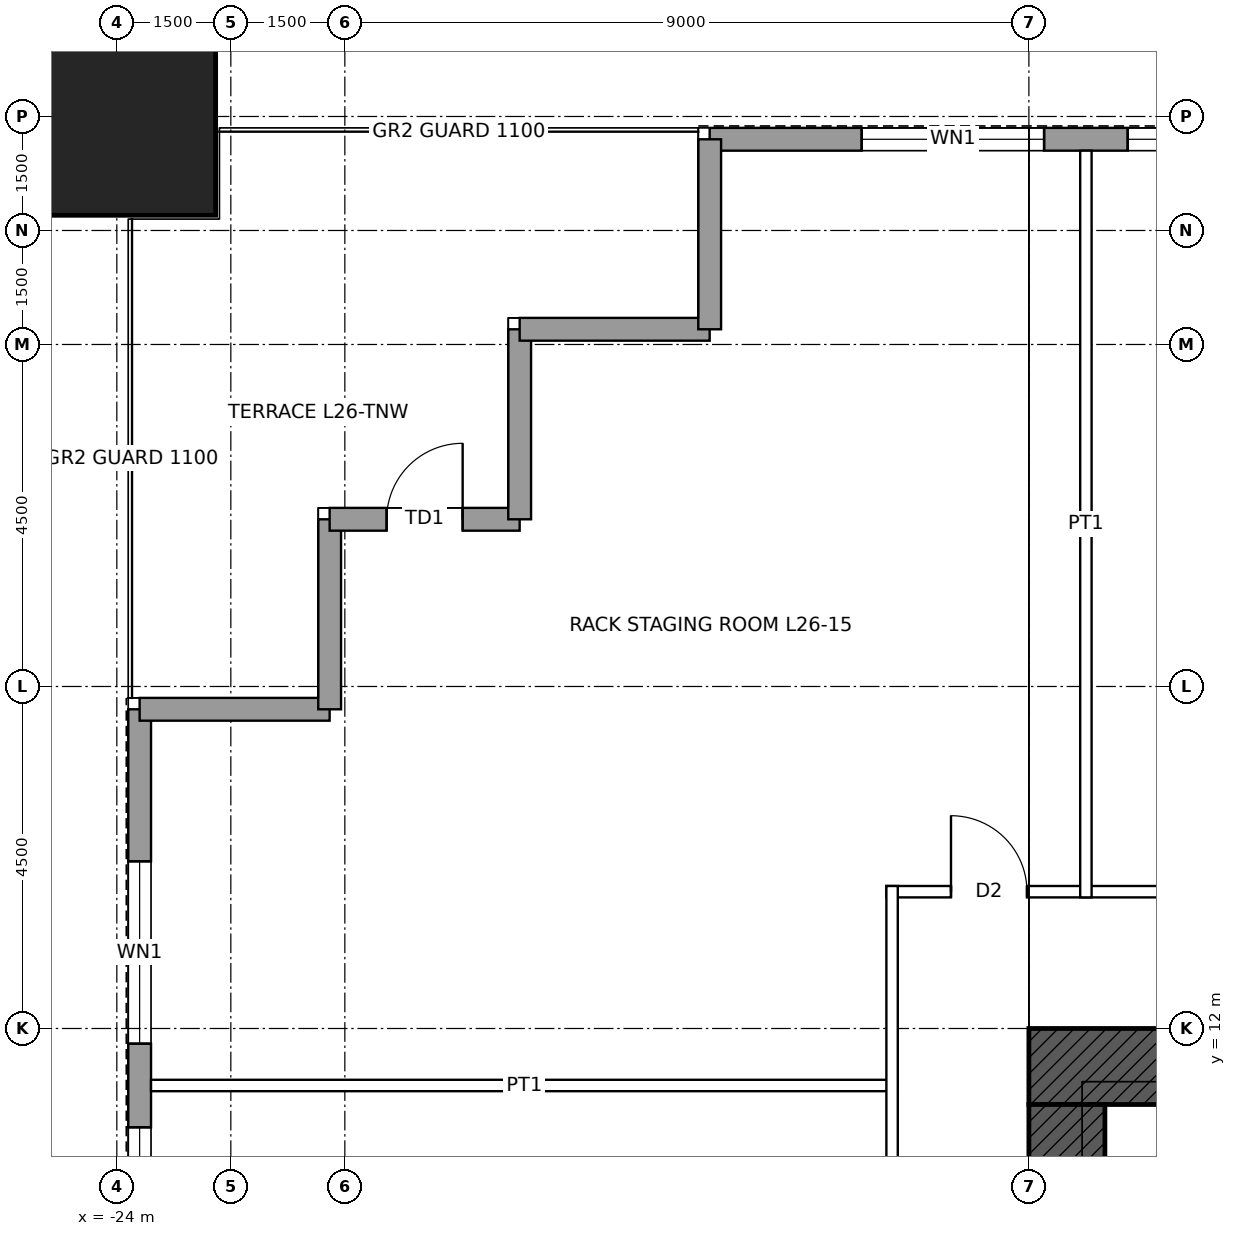
"""IFC4 building model, lengths in metres.
Left out: names, types, materials, properties, quantities, classifications, styles, units other than length and angle.
Written with IfcOpenShell. Run it as: python <this file> out.ifc"""

import sys

from ifc_helpers import new_model, si_unit, direction, frame, frame_2d, origin, origin_2d, place, context, subcontext, project, spatial, rectangle, hollow_rectangle, extrude, element, fill, save


model = new_model("IFC4")
c1 = context("Model", 3, precision=1e-05, world=origin(), true_north=direction((0.0, 1.0)))
c2 = subcontext(c1, "Body", "Model", "MODEL_VIEW")
j1 = project(units=[si_unit("LENGTHUNIT", "METRE"), si_unit("PLANEANGLEUNIT", "RADIAN")], contexts=[c1])
p1 = place(None, origin())
s1 = spatial("IfcSite", under=j1, at=p1, CompositionType="ELEMENT")
p2 = place(p1, origin())
s2 = spatial("IfcBuilding", under=s1, at=p2, CompositionType="ELEMENT")
p3 = place(p2, frame((0.0, 0.0, 131.4)))
s3 = spatial("IfcBuildingStorey", under=s2, at=p3, CompositionType="ELEMENT", Elevation=131.4)
p4 = place(p3, frame((-24.0, 24.0, 0.0), z_axis=(0.0, 0.0, 1.0), x_axis=(1.0, 0.0, 0.0)))
e1 = element("IfcColumn", 1, at=p4, inside=s3, PredefinedType="COLUMN", context=c2, shape_type="SweptSolid", body=[
    extrude(hollow_rectangle(XDim=2.6, YDim=2.6, WallThickness=0.13, at=origin_2d()), origin(), (0.0, 0.0, 1.0), 4.5),
])
p5 = place(p3, frame((-12.0, 11.5, 0.0), z_axis=(0.0, 0.0, 1.0), x_axis=(1.0, 0.0, 0.0)))
e2 = element("IfcWall", 2, at=p5, inside=s3, PredefinedType="SHEAR", context=c2, shape_type="SweptSolid", body=[
    extrude(rectangle(XDim=24.0, YDim=1.0, at=frame_2d((12.0, 0.0))), origin(), (0.0, 0.0, 1.0), 4.5),
])
p6 = place(p5, frame((6.25, 0.0, 0.0)))
e3 = element("IfcOpeningElement", 3, at=p6, cuts=e2, PredefinedType="OPENING", context=c2, shape_type="SweptSolid", body=[
    extrude(rectangle(XDim=1.0, YDim=2.4, at=frame_2d((0.5, 1.2))), frame((0.0, 0.51, 0.0), z_axis=(0.0, -1.0, 0.0), x_axis=(1.0, 0.0, 0.0)), (0.0, 0.0, 1.0), 1.02),
])
p7 = place(p5, frame((16.75, 0.0, 0.0)))
e4 = element("IfcOpeningElement", 4, at=p7, cuts=e2, PredefinedType="OPENING", context=c2, shape_type="SweptSolid", body=[
    extrude(rectangle(XDim=1.0, YDim=2.4, at=frame_2d((0.5, 1.2))), frame((0.0, 0.51, 0.0), z_axis=(0.0, -1.0, 0.0), x_axis=(1.0, 0.0, 0.0)), (0.0, 0.0, 1.0), 1.02),
])
p8 = place(p3, frame((-11.5, -11.0, 0.0), z_axis=(0.0, 0.0, 1.0), x_axis=(0.0, 1.0, 0.0)))
e5 = element("IfcWall", 5, at=p8, inside=s3, PredefinedType="SHEAR", context=c2, shape_type="SweptSolid", body=[
    extrude(rectangle(XDim=22.0, YDim=1.0, at=frame_2d((11.0, 0.0))), origin(), (0.0, 0.0, 1.0), 4.5),
])
p9 = place(p8, frame((10.5, 0.0, 0.0)))
e6 = element("IfcOpeningElement", 6, at=p9, cuts=e5, PredefinedType="OPENING", context=c2, shape_type="SweptSolid", body=[
    extrude(rectangle(XDim=1.0, YDim=2.4, at=frame_2d((0.5, 1.2))), frame((0.0, 0.51, 0.0), z_axis=(0.0, -1.0, 0.0), x_axis=(1.0, 0.0, 0.0)), (0.0, 0.0, 1.0), 1.02),
])
p10 = place(p3, frame((-16.2, 23.7, 0.0), z_axis=(0.0, 0.0, 1.0), x_axis=(1.0, 0.0, 0.0)))
e7 = element("IfcWall", 7, at=p10, inside=s3, PredefinedType="SOLIDWALL", context=c2, shape_type="SweptSolid", body=[
    extrude(rectangle(XDim=32.4, YDim=0.3, at=frame_2d((16.2, 0.0))), origin(), (0.0, 0.0, 1.0), 4.3),
])
p11 = place(p10, frame((2.0, 0.0, 1.0)))
e8 = element("IfcOpeningElement", 8, at=p11, cuts=e7, PredefinedType="OPENING", context=c2, shape_type="SweptSolid", body=[
    extrude(rectangle(XDim=2.4, YDim=1.2, at=frame_2d((1.2, 0.6))), frame((0.0, 0.16, 0.0), z_axis=(0.0, -1.0, 0.0), x_axis=(1.0, 0.0, 0.0)), (0.0, 0.0, 1.0), 0.32),
])
p12 = place(p10, frame((5.5, 0.0, 1.0)))
e9 = element("IfcOpeningElement", 9, at=p12, cuts=e7, PredefinedType="OPENING", context=c2, shape_type="SweptSolid", body=[
    extrude(rectangle(XDim=2.4, YDim=1.2, at=frame_2d((1.2, 0.6))), frame((0.0, 0.16, 0.0), z_axis=(0.0, -1.0, 0.0), x_axis=(1.0, 0.0, 0.0)), (0.0, 0.0, 1.0), 0.32),
])
p13 = place(p10, frame((9.5, 0.0, 1.0)))
e10 = element("IfcOpeningElement", 10, at=p13, cuts=e7, PredefinedType="OPENING", context=c2, shape_type="SweptSolid", body=[
    extrude(rectangle(XDim=2.4, YDim=1.2, at=frame_2d((1.2, 0.6))), frame((0.0, 0.16, 0.0), z_axis=(0.0, -1.0, 0.0), x_axis=(1.0, 0.0, 0.0)), (0.0, 0.0, 1.0), 0.32),
])
p14 = place(p10, frame((13.0, 0.0, 1.0)))
e11 = element("IfcOpeningElement", 11, at=p14, cuts=e7, PredefinedType="OPENING", context=c2, shape_type="SweptSolid", body=[
    extrude(rectangle(XDim=2.4, YDim=1.2, at=frame_2d((1.2, 0.6))), frame((0.0, 0.16, 0.0), z_axis=(0.0, -1.0, 0.0), x_axis=(1.0, 0.0, 0.0)), (0.0, 0.0, 1.0), 0.32),
])
p15 = place(p10, frame((17.0, 0.0, 1.0)))
e12 = element("IfcOpeningElement", 12, at=p15, cuts=e7, PredefinedType="OPENING", context=c2, shape_type="SweptSolid", body=[
    extrude(rectangle(XDim=2.4, YDim=1.2, at=frame_2d((1.2, 0.6))), frame((0.0, 0.16, 0.0), z_axis=(0.0, -1.0, 0.0), x_axis=(1.0, 0.0, 0.0)), (0.0, 0.0, 1.0), 0.32),
])
p16 = place(p10, frame((20.5, 0.0, 1.0)))
e13 = element("IfcOpeningElement", 13, at=p16, cuts=e7, PredefinedType="OPENING", context=c2, shape_type="SweptSolid", body=[
    extrude(rectangle(XDim=2.4, YDim=1.2, at=frame_2d((1.2, 0.6))), frame((0.0, 0.16, 0.0), z_axis=(0.0, -1.0, 0.0), x_axis=(1.0, 0.0, 0.0)), (0.0, 0.0, 1.0), 0.32),
])
p17 = place(p10, frame((24.5, 0.0, 1.0)))
e14 = element("IfcOpeningElement", 14, at=p17, cuts=e7, PredefinedType="OPENING", context=c2, shape_type="SweptSolid", body=[
    extrude(rectangle(XDim=2.4, YDim=1.2, at=frame_2d((1.2, 0.6))), frame((0.0, 0.16, 0.0), z_axis=(0.0, -1.0, 0.0), x_axis=(1.0, 0.0, 0.0)), (0.0, 0.0, 1.0), 0.32),
])
p18 = place(p10, frame((28.0, 0.0, 1.0)))
e15 = element("IfcOpeningElement", 15, at=p18, cuts=e7, PredefinedType="OPENING", context=c2, shape_type="SweptSolid", body=[
    extrude(rectangle(XDim=2.4, YDim=1.2, at=frame_2d((1.2, 0.6))), frame((0.0, 0.16, 0.0), z_axis=(0.0, -1.0, 0.0), x_axis=(1.0, 0.0, 0.0)), (0.0, 0.0, 1.0), 0.32),
])
p19 = place(p3, frame((-23.7, -16.2, 0.0), z_axis=(0.0, 0.0, 1.0), x_axis=(0.0, 1.0, 0.0)))
e16 = element("IfcWall", 16, at=p19, inside=s3, PredefinedType="SOLIDWALL", context=c2, shape_type="SweptSolid", body=[
    extrude(rectangle(XDim=32.4, YDim=0.3, at=frame_2d((16.2, 0.0))), origin(), (0.0, 0.0, 1.0), 4.3),
])
p20 = place(p19, frame((2.0, 0.0, 1.0)))
e17 = element("IfcOpeningElement", 17, at=p20, cuts=e16, PredefinedType="OPENING", context=c2, shape_type="SweptSolid", body=[
    extrude(rectangle(XDim=2.4, YDim=1.2, at=frame_2d((1.2, 0.6))), frame((0.0, 0.16, 0.0), z_axis=(0.0, -1.0, 0.0), x_axis=(1.0, 0.0, 0.0)), (0.0, 0.0, 1.0), 0.32),
])
p21 = place(p19, frame((5.5, 0.0, 1.0)))
e18 = element("IfcOpeningElement", 18, at=p21, cuts=e16, PredefinedType="OPENING", context=c2, shape_type="SweptSolid", body=[
    extrude(rectangle(XDim=2.4, YDim=1.2, at=frame_2d((1.2, 0.6))), frame((0.0, 0.16, 0.0), z_axis=(0.0, -1.0, 0.0), x_axis=(1.0, 0.0, 0.0)), (0.0, 0.0, 1.0), 0.32),
])
p22 = place(p19, frame((9.5, 0.0, 1.0)))
e19 = element("IfcOpeningElement", 19, at=p22, cuts=e16, PredefinedType="OPENING", context=c2, shape_type="SweptSolid", body=[
    extrude(rectangle(XDim=2.4, YDim=1.2, at=frame_2d((1.2, 0.6))), frame((0.0, 0.16, 0.0), z_axis=(0.0, -1.0, 0.0), x_axis=(1.0, 0.0, 0.0)), (0.0, 0.0, 1.0), 0.32),
])
p23 = place(p19, frame((13.0, 0.0, 1.0)))
e20 = element("IfcOpeningElement", 20, at=p23, cuts=e16, PredefinedType="OPENING", context=c2, shape_type="SweptSolid", body=[
    extrude(rectangle(XDim=2.4, YDim=1.2, at=frame_2d((1.2, 0.6))), frame((0.0, 0.16, 0.0), z_axis=(0.0, -1.0, 0.0), x_axis=(1.0, 0.0, 0.0)), (0.0, 0.0, 1.0), 0.32),
])
p24 = place(p19, frame((17.0, 0.0, 1.0)))
e21 = element("IfcOpeningElement", 21, at=p24, cuts=e16, PredefinedType="OPENING", context=c2, shape_type="SweptSolid", body=[
    extrude(rectangle(XDim=2.4, YDim=1.2, at=frame_2d((1.2, 0.6))), frame((0.0, 0.16, 0.0), z_axis=(0.0, -1.0, 0.0), x_axis=(1.0, 0.0, 0.0)), (0.0, 0.0, 1.0), 0.32),
])
p25 = place(p19, frame((20.5, 0.0, 1.0)))
e22 = element("IfcOpeningElement", 22, at=p25, cuts=e16, PredefinedType="OPENING", context=c2, shape_type="SweptSolid", body=[
    extrude(rectangle(XDim=2.4, YDim=1.2, at=frame_2d((1.2, 0.6))), frame((0.0, 0.16, 0.0), z_axis=(0.0, -1.0, 0.0), x_axis=(1.0, 0.0, 0.0)), (0.0, 0.0, 1.0), 0.32),
])
p26 = place(p19, frame((24.5, 0.0, 1.0)))
e23 = element("IfcOpeningElement", 23, at=p26, cuts=e16, PredefinedType="OPENING", context=c2, shape_type="SweptSolid", body=[
    extrude(rectangle(XDim=2.4, YDim=1.2, at=frame_2d((1.2, 0.6))), frame((0.0, 0.16, 0.0), z_axis=(0.0, -1.0, 0.0), x_axis=(1.0, 0.0, 0.0)), (0.0, 0.0, 1.0), 0.32),
])
p27 = place(p19, frame((28.0, 0.0, 1.0)))
e24 = element("IfcOpeningElement", 24, at=p27, cuts=e16, PredefinedType="OPENING", context=c2, shape_type="SweptSolid", body=[
    extrude(rectangle(XDim=2.4, YDim=1.2, at=frame_2d((1.2, 0.6))), frame((0.0, 0.16, 0.0), z_axis=(0.0, -1.0, 0.0), x_axis=(1.0, 0.0, 0.0)), (0.0, 0.0, 1.0), 0.32),
])
for number, where, z_axis, x_axis in (
    (25, (-23.7, 16.2, 0.0), (0.0, 0.0, 1.0), (1.0, 0.0, 0.0)),
    (26, (-21.2, 16.2, 0.0), (0.0, 0.0, 1.0), (0.0, 1.0, 0.0)),
):
    element("IfcWall", number, at=place(p3, frame(where, z_axis=z_axis, x_axis=x_axis)), inside=s3, PredefinedType="SOLIDWALL", context=c2, shape_type="SweptSolid", body=[
        extrude(rectangle(XDim=2.5, YDim=0.3, at=frame_2d((1.25, 0.0))), origin(), (0.0, 0.0, 1.0), 4.3),
    ])
p28 = place(p3, frame((-21.2, 18.7, 0.0), z_axis=(0.0, 0.0, 1.0), x_axis=(1.0, 0.0, 0.0)))
e27 = element("IfcWall", 27, at=p28, inside=s3, PredefinedType="SOLIDWALL", context=c2, shape_type="SweptSolid", body=[
    extrude(rectangle(XDim=2.5, YDim=0.3, at=frame_2d((1.25, 0.0))), origin(), (0.0, 0.0, 1.0), 4.3),
])
p29 = place(p28, frame((0.75, 0.0, 0.0)))
e28 = element("IfcOpeningElement", 28, at=p29, cuts=e27, PredefinedType="OPENING", context=c2, shape_type="SweptSolid", body=[
    extrude(rectangle(XDim=1.0, YDim=2.4, at=frame_2d((0.5, 1.2))), frame((0.0, 0.16, 0.0), z_axis=(0.0, -1.0, 0.0), x_axis=(1.0, 0.0, 0.0)), (0.0, 0.0, 1.0), 0.32),
])
for number, where, z_axis, x_axis in (
    (29, (-18.7, 18.7, 0.0), (0.0, 0.0, 1.0), (0.0, 1.0, 0.0)),
    (30, (-18.7, 21.2, 0.0), (0.0, 0.0, 1.0), (1.0, 0.0, 0.0)),
    (31, (-16.2, 21.2, 0.0), (0.0, 0.0, 1.0), (0.0, 1.0, 0.0)),
):
    element("IfcWall", number, at=place(p3, frame(where, z_axis=z_axis, x_axis=x_axis)), inside=s3, PredefinedType="SOLIDWALL", context=c2, shape_type="SweptSolid", body=[
        extrude(rectangle(XDim=2.5, YDim=0.3, at=frame_2d((1.25, 0.0))), origin(), (0.0, 0.0, 1.0), 4.3),
    ])
p30 = place(p3, frame((-23.55, 11.25, 0.0), z_axis=(0.0, 0.0, 1.0), x_axis=(1.0, 0.0, 0.0)))
e32 = element("IfcWall", 32, at=p30, inside=s3, PredefinedType="PARTITIONING", context=c2, shape_type="SweptSolid", body=[
    extrude(rectangle(XDim=9.825, YDim=0.15, at=frame_2d((4.913, 0.0))), origin(), (0.0, 0.0, 1.0), 3.431),
])
p31 = place(p3, frame((-13.875, 13.8, 0.0), z_axis=(0.0, 0.0, 1.0), x_axis=(1.0, 0.0, 0.0)))
e33 = element("IfcWall", 33, at=p31, inside=s3, PredefinedType="PARTITIONING", context=c2, shape_type="SweptSolid", body=[
    extrude(rectangle(XDim=27.75, YDim=0.15, at=frame_2d((13.875, 0.0))), origin(), (0.0, 0.0, 1.0), 4.3),
])
p32 = place(p31, frame((5.475, 0.0, 0.0)))
e34 = element("IfcOpeningElement", 34, at=p32, cuts=e33, PredefinedType="OPENING", context=c2, shape_type="SweptSolid", body=[
    extrude(rectangle(XDim=1.8, YDim=2.4, at=frame_2d((0.9, 1.2))), frame((0.0, 0.085, 0.0), z_axis=(0.0, -1.0, 0.0), x_axis=(1.0, 0.0, 0.0)), (0.0, 0.0, 1.0), 0.17),
])
p33 = place(p31, frame((13.375, 0.0, 0.0)))
e35 = element("IfcOpeningElement", 35, at=p33, cuts=e33, PredefinedType="OPENING", context=c2, shape_type="SweptSolid", body=[
    extrude(rectangle(XDim=1.0, YDim=2.1, at=frame_2d((0.5, 1.05))), frame((0.0, 0.085, 0.0), z_axis=(0.0, -1.0, 0.0), x_axis=(1.0, 0.0, 0.0)), (0.0, 0.0, 1.0), 0.17),
])
p34 = place(p31, frame((20.475, 0.0, 0.0)))
e36 = element("IfcOpeningElement", 36, at=p34, cuts=e33, PredefinedType="OPENING", context=c2, shape_type="SweptSolid", body=[
    extrude(rectangle(XDim=1.8, YDim=2.4, at=frame_2d((0.9, 1.2))), frame((0.0, 0.085, 0.0), z_axis=(0.0, -1.0, 0.0), x_axis=(1.0, 0.0, 0.0)), (0.0, 0.0, 1.0), 0.17),
])
p35 = place(p31, frame((25.9, 0.0, 0.0)))
e37 = element("IfcOpeningElement", 37, at=p35, cuts=e33, PredefinedType="OPENING", context=c2, shape_type="SweptSolid", body=[
    extrude(rectangle(XDim=1.0, YDim=2.1, at=frame_2d((0.5, 1.05))), frame((0.0, 0.085, 0.0), z_axis=(0.0, -1.0, 0.0), x_axis=(1.0, 0.0, 0.0)), (0.0, 0.0, 1.0), 0.17),
])
p36 = place(p31, frame((0.85, 0.0, 0.0)))
e38 = element("IfcOpeningElement", 38, at=p36, cuts=e33, PredefinedType="OPENING", context=c2, shape_type="SweptSolid", body=[
    extrude(rectangle(XDim=1.0, YDim=2.1, at=frame_2d((0.5, 1.05))), frame((0.0, 0.085, 0.0), z_axis=(0.0, -1.0, 0.0), x_axis=(1.0, 0.0, 0.0)), (0.0, 0.0, 1.0), 0.17),
])
p37 = place(p3, frame((-13.8, -13.875, 0.0), z_axis=(0.0, 0.0, 1.0), x_axis=(0.0, 1.0, 0.0)))
e39 = element("IfcWall", 39, at=p37, inside=s3, PredefinedType="PARTITIONING", context=c2, shape_type="SweptSolid", body=[
    extrude(rectangle(XDim=27.75, YDim=0.15, at=frame_2d((13.875, 0.0))), origin(), (0.0, 0.0, 1.0), 4.3),
])
p38 = place(p37, frame((7.75, 0.0, 0.0)))
e40 = element("IfcOpeningElement", 40, at=p38, cuts=e39, PredefinedType="OPENING", context=c2, shape_type="SweptSolid", body=[
    extrude(rectangle(XDim=1.0, YDim=2.1, at=frame_2d((0.5, 1.05))), frame((0.0, 0.085, 0.0), z_axis=(0.0, -1.0, 0.0), x_axis=(1.0, 0.0, 0.0)), (0.0, 0.0, 1.0), 0.17),
])
p39 = place(p37, frame((18.6, 0.0, 0.0)))
e41 = element("IfcOpeningElement", 41, at=p39, cuts=e39, PredefinedType="OPENING", context=c2, shape_type="SweptSolid", body=[
    extrude(rectangle(XDim=1.8, YDim=2.4, at=frame_2d((0.9, 1.2))), frame((0.0, 0.085, 0.0), z_axis=(0.0, -1.0, 0.0), x_axis=(1.0, 0.0, 0.0)), (0.0, 0.0, 1.0), 0.17),
])
p40 = place(p3, frame((-11.25, 13.725, 0.0), z_axis=(0.0, 0.0, 1.0), x_axis=(0.0, 1.0, 0.0)))
e42 = element("IfcWall", 42, at=p40, inside=s3, PredefinedType="PARTITIONING", context=c2, shape_type="SweptSolid", body=[
    extrude(rectangle(XDim=9.825, YDim=0.15, at=frame_2d((4.913, 0.0))), origin(), (0.0, 0.0, 1.0), 3.431),
])
p41 = place(p11, origin())
e43 = element("IfcWindow", 43, at=p41, inside=s3, PartitioningType="SINGLE_PANEL", PredefinedType="WINDOW", context=c2, shape_type="SweptSolid", body=[
    extrude(rectangle(XDim=2.4, YDim=1.2, at=frame_2d((1.2, 0.6))), frame((0.0, 0.03, 0.0), z_axis=(0.0, -1.0, 0.0), x_axis=(1.0, 0.0, 0.0)), (0.0, 0.0, 1.0), 0.06),
])
fill(e8, e43)
p42 = place(p12, origin())
e44 = element("IfcWindow", 44, at=p42, inside=s3, PartitioningType="SINGLE_PANEL", PredefinedType="WINDOW", context=c2, shape_type="SweptSolid", body=[
    extrude(rectangle(XDim=2.4, YDim=1.2, at=frame_2d((1.2, 0.6))), frame((0.0, 0.03, 0.0), z_axis=(0.0, -1.0, 0.0), x_axis=(1.0, 0.0, 0.0)), (0.0, 0.0, 1.0), 0.06),
])
fill(e9, e44)
p43 = place(p26, origin())
e45 = element("IfcWindow", 45, at=p43, inside=s3, PartitioningType="SINGLE_PANEL", PredefinedType="WINDOW", context=c2, shape_type="SweptSolid", body=[
    extrude(rectangle(XDim=2.4, YDim=1.2, at=frame_2d((1.2, 0.6))), frame((0.0, 0.03, 0.0), z_axis=(0.0, -1.0, 0.0), x_axis=(1.0, 0.0, 0.0)), (0.0, 0.0, 1.0), 0.06),
])
fill(e23, e45)
p44 = place(p27, origin())
e46 = element("IfcWindow", 46, at=p44, inside=s3, PartitioningType="SINGLE_PANEL", PredefinedType="WINDOW", context=c2, shape_type="SweptSolid", body=[
    extrude(rectangle(XDim=2.4, YDim=1.2, at=frame_2d((1.2, 0.6))), frame((0.0, 0.03, 0.0), z_axis=(0.0, -1.0, 0.0), x_axis=(1.0, 0.0, 0.0)), (0.0, 0.0, 1.0), 0.06),
])
fill(e24, e46)
p45 = place(p29, origin())
e47 = element("IfcDoor", 47, at=p45, inside=s3, OperationType="SINGLE_SWING_RIGHT", PredefinedType="DOOR", context=c2, shape_type="SweptSolid", body=[
    extrude(rectangle(XDim=1.0, YDim=2.4, at=frame_2d((0.5, 1.2))), frame((0.0, 0.025, 0.0), z_axis=(0.0, -1.0, 0.0), x_axis=(1.0, 0.0, 0.0)), (0.0, 0.0, 1.0), 0.05),
])
fill(e28, e47)
p46 = place(p36, origin())
e48 = element("IfcDoor", 48, at=p46, inside=s3, OperationType="SINGLE_SWING_LEFT", PredefinedType="DOOR", context=c2, shape_type="SweptSolid", body=[
    extrude(rectangle(XDim=1.0, YDim=2.1, at=frame_2d((0.5, 1.05))), frame((0.0, 0.025, 0.0), z_axis=(0.0, -1.0, 0.0), x_axis=(1.0, 0.0, 0.0)), (0.0, 0.0, 1.0), 0.05),
])
fill(e38, e48)
save(model, sys.argv[1])
